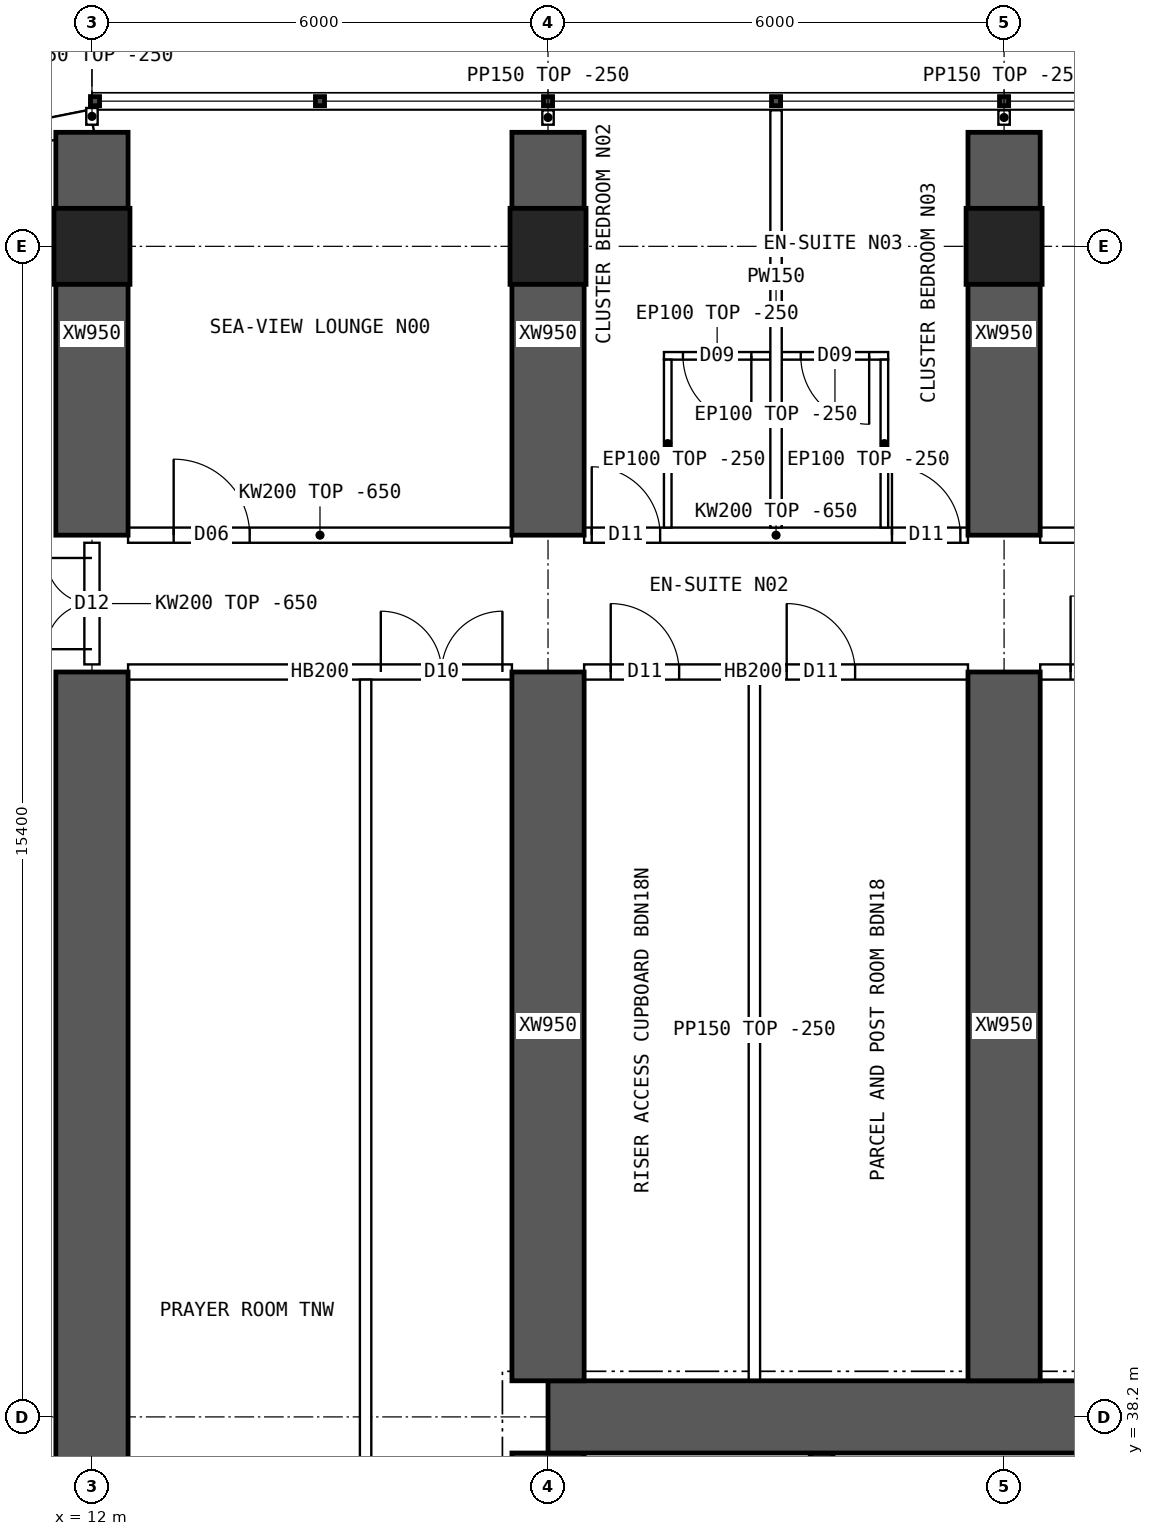
"""IFC4 building model, lengths in metres.
Left out: names, types, materials, properties, quantities, classifications, styles, units other than length and angle.
Written with IfcOpenShell. Run it as: python <this file> out.ifc"""

import sys

from ifc_helpers import new_model, si_unit, direction, frame, frame_2d, origin, origin_2d, place, context, subcontext, project, spatial, polyline, rectangle, hollow_rectangle, outline, extrude, element, fill, save


model = new_model("IFC4")
c1 = context("Model", 3, precision=1e-05, world=origin(), true_north=direction((0.0, 1.0)))
c2 = subcontext(c1, "Body", "Model", "MODEL_VIEW")
j1 = project(units=[si_unit("LENGTHUNIT", "METRE"), si_unit("PLANEANGLEUNIT", "RADIAN")], contexts=[c1])
p1 = place(None, origin())
s1 = spatial("IfcSite", under=j1, at=p1, CompositionType="ELEMENT")
p2 = place(p1, origin())
s2 = spatial("IfcBuilding", under=s1, at=p2, CompositionType="ELEMENT")
p3 = place(p2, frame((0.0, 0.0, 99.4)))
s3 = spatial("IfcBuildingStorey", under=s2, at=p3, CompositionType="ELEMENT", Elevation=99.4)
for number, where, z_axis, x_axis in (
    (1, (12.0, 53.6, 0.0), (0.0, 0.0, 1.0), (1.0, 0.0, 0.0)),
    (2, (18.0, 53.6, 0.0), (0.0, 0.0, 1.0), (1.0, 0.0, 0.0)),
    (3, (24.0, 53.6, 0.0), (0.0, 0.0, 1.0), (1.0, 0.0, 0.0)),
):
    element("IfcColumn", number, at=place(p3, frame(where, z_axis=z_axis, x_axis=x_axis)), inside=s3, PredefinedType="COLUMN", context=c2, shape_type="SweptSolid", body=[
        extrude(hollow_rectangle(XDim=1.0, YDim=1.0, WallThickness=0.1, at=origin_2d()), origin(), (0.0, 0.0, 1.0), 3.75),
    ])
p4 = place(p3, frame((18.0, 38.2, 0.0), z_axis=(0.0, 0.0, 1.0), x_axis=(1.0, 0.0, 0.0)))
e4 = element("IfcWall", 4, at=p4, inside=s3, PredefinedType="SHEAR", context=c2, shape_type="SweptSolid", body=[
    extrude(rectangle(XDim=48.0, YDim=0.95, at=frame_2d((24.0, 0.0))), origin(), (0.0, 0.0, 1.0), 3.75),
])
p5 = place(p3, frame((18.0, 26.275, 0.0), z_axis=(0.0, 0.0, 1.0), x_axis=(0.0, 1.0, 0.0)))
e5 = element("IfcWall", 5, at=p5, inside=s3, PredefinedType="SHEAR", context=c2, shape_type="SweptSolid", body=[
    extrude(rectangle(XDim=11.45, YDim=0.95, at=frame_2d((5.725, 0.0))), origin(), (0.0, 0.0, 1.0), 3.75),
])
p6 = place(p5, frame((5.025, 0.0, 0.0)))
e6 = element("IfcOpeningElement", 6, at=p6, cuts=e5, PredefinedType="OPENING", context=c2, shape_type="SweptSolid", body=[
    extrude(rectangle(XDim=1.2, YDim=2.1, at=frame_2d((0.6, 1.05))), frame((0.0, 0.485, 0.0), z_axis=(0.0, -1.0, 0.0), x_axis=(1.0, 0.0, 0.0)), (0.0, 0.0, 1.0), 0.97),
])
p7 = place(p3, frame((21.6, 34.75, 0.0), z_axis=(0.0, 0.0, 1.0), x_axis=(0.0, 1.0, 0.0)))
e7 = element("IfcWall", 7, at=p7, inside=s3, PredefinedType="SHEAR", context=c2, shape_type="SweptSolid", body=[
    extrude(rectangle(XDim=2.975, YDim=0.3, at=frame_2d((1.488, 0.0))), origin(), (0.0, 0.0, 1.0), 3.75),
])
p8 = place(p3, frame((12.0, 49.8, 0.0), z_axis=(0.0, 0.0, 1.0), x_axis=(0.0, 1.0, 0.0)))
e8 = element("IfcWall", 8, at=p8, inside=s3, PredefinedType="SHEAR", context=c2, shape_type="SweptSolid", body=[
    extrude(rectangle(XDim=5.3, YDim=0.95, at=frame_2d((2.65, 0.0))), origin(), (0.0, 0.0, 1.0), 3.75),
])
p9 = place(p3, frame((12.0, 16.0, 0.0), z_axis=(0.0, 0.0, 1.0), x_axis=(0.0, 1.0, 0.0)))
e9 = element("IfcWall", 9, at=p9, inside=s3, PredefinedType="SHEAR", context=c2, shape_type="SweptSolid", body=[
    extrude(rectangle(XDim=32.0, YDim=0.95, at=frame_2d((16.0, 0.0))), origin(), (0.0, 0.0, 1.0), 3.75),
])
p10 = place(p3, frame((18.0, 49.8, 0.0), z_axis=(0.0, 0.0, 1.0), x_axis=(0.0, 1.0, 0.0)))
e10 = element("IfcWall", 10, at=p10, inside=s3, PredefinedType="SHEAR", context=c2, shape_type="SweptSolid", body=[
    extrude(rectangle(XDim=5.3, YDim=0.95, at=frame_2d((2.65, 0.0))), origin(), (0.0, 0.0, 1.0), 3.75),
])
p11 = place(p3, frame((18.0, 38.675, 0.0), z_axis=(0.0, 0.0, 1.0), x_axis=(0.0, 1.0, 0.0)))
e11 = element("IfcWall", 11, at=p11, inside=s3, PredefinedType="SHEAR", context=c2, shape_type="SweptSolid", body=[
    extrude(rectangle(XDim=9.325, YDim=0.95, at=frame_2d((4.663, 0.0))), origin(), (0.0, 0.0, 1.0), 3.75),
])
p12 = place(p3, frame((24.0, 49.8, 0.0), z_axis=(0.0, 0.0, 1.0), x_axis=(0.0, 1.0, 0.0)))
e12 = element("IfcWall", 12, at=p12, inside=s3, PredefinedType="SHEAR", context=c2, shape_type="SweptSolid", body=[
    extrude(rectangle(XDim=5.3, YDim=0.95, at=frame_2d((2.65, 0.0))), origin(), (0.0, 0.0, 1.0), 3.75),
])
p13 = place(p3, frame((24.0, 38.675, 0.0), z_axis=(0.0, 0.0, 1.0), x_axis=(0.0, 1.0, 0.0)))
e13 = element("IfcWall", 13, at=p13, inside=s3, PredefinedType="SHEAR", context=c2, shape_type="SweptSolid", body=[
    extrude(rectangle(XDim=9.325, YDim=0.95, at=frame_2d((4.663, 0.0))), origin(), (0.0, 0.0, 1.0), 3.75),
])
p14 = place(p3, frame((12.0, 55.25, 0.0), z_axis=(0.0, 0.0, 1.0), x_axis=(-0.980787251524, -0.195080412259, 0.0)))
e14 = element("IfcWall", 14, at=p14, inside=s3, PredefinedType="SOLIDWALL", context=c2, shape_type="SweptSolid", body=[
    extrude(outline(polyline([(-0.03, -0.15), (3.249, -0.15), (3.189, 0.15), (0.03, 0.15), (-0.03, -0.15)])), origin(), (0.0, 0.0, 1.0), 3.5),
])
p15 = place(p14, frame((0.909, 0.0, 0.9)))
e15 = element("IfcOpeningElement", 15, at=p15, cuts=e14, PredefinedType="OPENING", context=c2, shape_type="SweptSolid", body=[
    extrude(rectangle(XDim=1.4, YDim=1.8, at=frame_2d((0.7, 0.9))), frame((0.0, 0.16, 0.0), z_axis=(0.0, -1.0, 0.0), x_axis=(1.0, 0.0, 0.0)), (0.0, 0.0, 1.0), 0.32),
])
p16 = place(p3, frame((12.475, 49.8, 0.0), z_axis=(0.0, 0.0, 1.0), x_axis=(1.0, 0.0, 0.0)))
e16 = element("IfcWall", 16, at=p16, inside=s3, PredefinedType="SOLIDWALL", context=c2, shape_type="SweptSolid", body=[
    extrude(outline(polyline([(0.0, 0.0), (5.05, 0.0), (5.05, 3.1), (0.0, 3.1), (0.0, 0.0)])), frame((0.0, 0.1, 0.0), z_axis=(0.0, -1.0, 0.0), x_axis=(1.0, 0.0, 0.0)), (0.0, 0.0, 1.0), 0.2),
])
p17 = place(p16, frame((0.6, 0.0, 0.0)))
e17 = element("IfcOpeningElement", 17, at=p17, cuts=e16, PredefinedType="OPENING", context=c2, shape_type="SweptSolid", body=[
    extrude(rectangle(XDim=1.0, YDim=2.1, at=frame_2d((0.5, 1.05))), frame((0.0, 0.11, 0.0), z_axis=(0.0, -1.0, 0.0), x_axis=(1.0, 0.0, 0.0)), (0.0, 0.0, 1.0), 0.22),
])
p18 = place(p3, frame((12.475, 48.0, 0.0), z_axis=(0.0, 0.0, 1.0), x_axis=(1.0, 0.0, 0.0)))
e18 = element("IfcWall", 18, at=p18, inside=s3, PredefinedType="SOLIDWALL", context=c2, shape_type="SweptSolid", body=[
    extrude(rectangle(XDim=5.05, YDim=0.2, at=frame_2d((2.525, 0.0))), origin(), (0.0, 0.0, 1.0), 3.5),
])
p19 = place(p18, frame((3.325, 0.0, 0.0)))
e19 = element("IfcOpeningElement", 19, at=p19, cuts=e18, PredefinedType="OPENING", context=c2, shape_type="SweptSolid", body=[
    extrude(rectangle(XDim=1.6, YDim=2.1, at=frame_2d((0.8, 1.05))), frame((0.0, 0.11, 0.0), z_axis=(0.0, -1.0, 0.0), x_axis=(1.0, 0.0, 0.0)), (0.0, 0.0, 1.0), 0.22),
])
p20 = place(p3, frame((18.475, 49.8, 0.0), z_axis=(0.0, 0.0, 1.0), x_axis=(1.0, 0.0, 0.0)))
e20 = element("IfcWall", 20, at=p20, inside=s3, PredefinedType="SOLIDWALL", context=c2, shape_type="SweptSolid", body=[
    extrude(outline(polyline([(0.0, 0.0), (5.05, 0.0), (5.05, 3.1), (0.0, 3.1), (0.0, 0.0)])), frame((0.0, 0.1, 0.0), z_axis=(0.0, -1.0, 0.0), x_axis=(1.0, 0.0, 0.0)), (0.0, 0.0, 1.0), 0.2),
])
p21 = place(p20, frame((0.1, 0.0, 0.0)))
e21 = element("IfcOpeningElement", 21, at=p21, cuts=e20, PredefinedType="OPENING", context=c2, shape_type="SweptSolid", body=[
    extrude(rectangle(XDim=0.9, YDim=2.1, at=frame_2d((0.45, 1.05))), frame((0.0, 0.11, 0.0), z_axis=(0.0, -1.0, 0.0), x_axis=(1.0, 0.0, 0.0)), (0.0, 0.0, 1.0), 0.22),
])
p22 = place(p20, frame((4.05, 0.0, 0.0)))
e22 = element("IfcOpeningElement", 22, at=p22, cuts=e20, PredefinedType="OPENING", context=c2, shape_type="SweptSolid", body=[
    extrude(rectangle(XDim=0.9, YDim=2.1, at=frame_2d((0.45, 1.05))), frame((0.0, 0.11, 0.0), z_axis=(0.0, -1.0, 0.0), x_axis=(1.0, 0.0, 0.0)), (0.0, 0.0, 1.0), 0.22),
])
p23 = place(p3, frame((18.475, 48.0, 0.0), z_axis=(0.0, 0.0, 1.0), x_axis=(1.0, 0.0, 0.0)))
e23 = element("IfcWall", 23, at=p23, inside=s3, PredefinedType="SOLIDWALL", context=c2, shape_type="SweptSolid", body=[
    extrude(rectangle(XDim=5.05, YDim=0.2, at=frame_2d((2.525, 0.0))), origin(), (0.0, 0.0, 1.0), 3.5),
])
p24 = place(p23, frame((0.35, 0.0, 0.0)))
e24 = element("IfcOpeningElement", 24, at=p24, cuts=e23, PredefinedType="OPENING", context=c2, shape_type="SweptSolid", body=[
    extrude(rectangle(XDim=0.9, YDim=2.1, at=frame_2d((0.45, 1.05))), frame((0.0, 0.11, 0.0), z_axis=(0.0, -1.0, 0.0), x_axis=(1.0, 0.0, 0.0)), (0.0, 0.0, 1.0), 0.22),
])
p25 = place(p23, frame((2.665, 0.0, 0.0)))
e25 = element("IfcOpeningElement", 25, at=p25, cuts=e23, PredefinedType="OPENING", context=c2, shape_type="SweptSolid", body=[
    extrude(rectangle(XDim=0.9, YDim=2.1, at=frame_2d((0.45, 1.05))), frame((0.0, 0.11, 0.0), z_axis=(0.0, -1.0, 0.0), x_axis=(1.0, 0.0, 0.0)), (0.0, 0.0, 1.0), 0.22),
])
p26 = place(p3, frame((24.475, 49.8, 0.0), z_axis=(0.0, 0.0, 1.0), x_axis=(1.0, 0.0, 0.0)))
e26 = element("IfcWall", 26, at=p26, inside=s3, PredefinedType="SOLIDWALL", context=c2, shape_type="SweptSolid", body=[
    extrude(outline(polyline([(0.0, 0.0), (5.05, 0.0), (5.05, 3.1), (0.0, 3.1), (0.0, 0.0)])), frame((0.0, 0.1, 0.0), z_axis=(0.0, -1.0, 0.0), x_axis=(1.0, 0.0, 0.0)), (0.0, 0.0, 1.0), 0.2),
])
p27 = place(p26, frame((0.6, 0.0, 0.0)))
e27 = element("IfcOpeningElement", 27, at=p27, cuts=e26, PredefinedType="OPENING", context=c2, shape_type="SweptSolid", body=[
    extrude(rectangle(XDim=1.0, YDim=2.1, at=frame_2d((0.5, 1.05))), frame((0.0, 0.11, 0.0), z_axis=(0.0, -1.0, 0.0), x_axis=(1.0, 0.0, 0.0)), (0.0, 0.0, 1.0), 0.22),
])
p28 = place(p3, frame((24.475, 48.0, 0.0), z_axis=(0.0, 0.0, 1.0), x_axis=(1.0, 0.0, 0.0)))
e28 = element("IfcWall", 28, at=p28, inside=s3, PredefinedType="SOLIDWALL", context=c2, shape_type="SweptSolid", body=[
    extrude(rectangle(XDim=5.05, YDim=0.2, at=frame_2d((2.525, 0.0))), origin(), (0.0, 0.0, 1.0), 3.5),
])
p29 = place(p28, frame((0.4, 0.0, 0.0)))
e29 = element("IfcOpeningElement", 29, at=p29, cuts=e28, PredefinedType="OPENING", context=c2, shape_type="SweptSolid", body=[
    extrude(rectangle(XDim=1.0, YDim=2.1, at=frame_2d((0.5, 1.05))), frame((0.0, 0.11, 0.0), z_axis=(0.0, -1.0, 0.0), x_axis=(1.0, 0.0, 0.0)), (0.0, 0.0, 1.0), 0.22),
])
p30 = place(p3, frame((21.0, 55.39, 0.0), z_axis=(0.0, 0.0, 1.0), x_axis=(0.0, -1.0, 0.0)))
e30 = element("IfcWall", 30, at=p30, inside=s3, PredefinedType="PARTITIONING", context=c2, shape_type="SweptSolid", body=[
    extrude(outline(polyline([(0.0, 0.0), (5.49, 0.0), (5.49, 3.1), (5.442, 3.1), (5.44, 3.5), (1.992, 3.5), (1.99, 3.1), (1.592, 3.1), (1.59, 3.5), (0.0, 3.5), (0.0, 0.0)])), frame((0.0, 0.075, 0.0), z_axis=(0.0, -1.0, 0.0), x_axis=(1.0, 0.0, 0.0)), (0.0, 0.0, 1.0), 0.15),
])
p31 = place(p3, frame((19.525, 52.159, 0.0), z_axis=(0.0, 0.0, 1.0), x_axis=(1.0, 0.0, 0.0)))
e31 = element("IfcWall", 31, at=p31, inside=s3, PredefinedType="PARTITIONING", context=c2, shape_type="SweptSolid", body=[
    extrude(rectangle(XDim=1.4, YDim=0.1, at=frame_2d((0.7, 0.0))), origin(), (0.0, 0.0, 1.0), 3.5),
])
p32 = place(p31, frame((0.25, 0.0, 0.0)))
e32 = element("IfcOpeningElement", 32, at=p32, cuts=e31, PredefinedType="OPENING", context=c2, shape_type="SweptSolid", body=[
    extrude(rectangle(XDim=0.9, YDim=2.1, at=frame_2d((0.45, 1.05))), frame((0.0, 0.06, 0.0), z_axis=(0.0, -1.0, 0.0), x_axis=(1.0, 0.0, 0.0)), (0.0, 0.0, 1.0), 0.12),
])
p33 = place(p3, frame((19.575, 52.109, 0.0), z_axis=(0.0, 0.0, 1.0), x_axis=(0.0, -1.0, 0.0)))
e33 = element("IfcWall", 33, at=p33, inside=s3, PredefinedType="PARTITIONING", context=c2, shape_type="SweptSolid", body=[
    extrude(outline(polyline([(0.0, 0.0), (2.209, 0.0), (2.209, 3.1), (2.161, 3.1), (2.159, 3.5), (0.0, 3.5), (0.0, 0.0)])), frame((0.0, 0.05, 0.0), z_axis=(0.0, -1.0, 0.0), x_axis=(1.0, 0.0, 0.0)), (0.0, 0.0, 1.0), 0.1),
])
p34 = place(p3, frame((21.075, 52.159, 0.0), z_axis=(0.0, 0.0, 1.0), x_axis=(1.0, 0.0, 0.0)))
e34 = element("IfcWall", 34, at=p34, inside=s3, PredefinedType="PARTITIONING", context=c2, shape_type="SweptSolid", body=[
    extrude(rectangle(XDim=1.4, YDim=0.1, at=frame_2d((0.7, 0.0))), origin(), (0.0, 0.0, 1.0), 3.5),
])
p35 = place(p34, frame((0.25, 0.0, 0.0)))
e35 = element("IfcOpeningElement", 35, at=p35, cuts=e34, PredefinedType="OPENING", context=c2, shape_type="SweptSolid", body=[
    extrude(rectangle(XDim=0.9, YDim=2.1, at=frame_2d((0.45, 1.05))), frame((0.0, 0.06, 0.0), z_axis=(0.0, -1.0, 0.0), x_axis=(1.0, 0.0, 0.0)), (0.0, 0.0, 1.0), 0.12),
])
p36 = place(p3, frame((22.425, 52.109, 0.0), z_axis=(0.0, 0.0, 1.0), x_axis=(0.0, -1.0, 0.0)))
e36 = element("IfcWall", 36, at=p36, inside=s3, PredefinedType="PARTITIONING", context=c2, shape_type="SweptSolid", body=[
    extrude(outline(polyline([(0.0, 0.0), (2.209, 0.0), (2.209, 3.1), (2.161, 3.1), (2.159, 3.5), (0.0, 3.5), (0.0, 0.0)])), frame((0.0, 0.05, 0.0), z_axis=(0.0, -1.0, 0.0), x_axis=(1.0, 0.0, 0.0)), (0.0, 0.0, 1.0), 0.1),
])
p37 = place(p3, frame((20.715, 38.675, 0.0), z_axis=(0.0, 0.0, 1.0), x_axis=(0.0, 1.0, 0.0)))
e37 = element("IfcWall", 37, at=p37, inside=s3, PredefinedType="PARTITIONING", context=c2, shape_type="SweptSolid", body=[
    extrude(rectangle(XDim=9.225, YDim=0.15, at=frame_2d((4.612, 0.0))), origin(), (0.0, 0.0, 1.0), 3.5),
])
p38 = place(p3, frame((15.6, 16.1, 0.0), z_axis=(0.0, 0.0, 1.0), x_axis=(0.0, 1.0, 0.0)))
e38 = element("IfcWall", 38, at=p38, inside=s3, PredefinedType="PARTITIONING", context=c2, shape_type="SweptSolid", body=[
    extrude(rectangle(XDim=31.8, YDim=0.15, at=frame_2d((15.9, 0.0))), origin(), (0.0, 0.0, 1.0), 3.5),
])
p39 = place(p38, frame((13.2, 0.0, 0.0)))
e39 = element("IfcOpeningElement", 39, at=p39, cuts=e38, PredefinedType="OPENING", context=c2, shape_type="SweptSolid", body=[
    extrude(rectangle(XDim=1.0, YDim=2.1, at=frame_2d((0.5, 1.05))), frame((0.0, 0.085, 0.0), z_axis=(0.0, -1.0, 0.0), x_axis=(1.0, 0.0, 0.0)), (0.0, 0.0, 1.0), 0.17),
])
p40 = place(p38, frame((16.2, 0.0, 0.0)))
e40 = element("IfcOpeningElement", 40, at=p40, cuts=e38, PredefinedType="OPENING", context=c2, shape_type="SweptSolid", body=[
    extrude(rectangle(XDim=1.0, YDim=2.1, at=frame_2d((0.5, 1.05))), frame((0.0, 0.085, 0.0), z_axis=(0.0, -1.0, 0.0), x_axis=(1.0, 0.0, 0.0)), (0.0, 0.0, 1.0), 0.17),
])
p41 = place(p3, frame((12.0, 48.1, 0.0), z_axis=(0.0, 0.0, 1.0), x_axis=(0.0, 1.0, 0.0)))
e41 = element("IfcWall", 41, at=p41, inside=s3, PredefinedType="SOLIDWALL", context=c2, shape_type="SweptSolid", body=[
    extrude(outline(polyline([(0.0, 0.0), (1.6, 0.0), (1.6, 3.1), (0.0, 3.1), (0.0, 0.0)])), frame((0.0, 0.1, 0.0), z_axis=(0.0, -1.0, 0.0), x_axis=(1.0, 0.0, 0.0)), (0.0, 0.0, 1.0), 0.2),
])
p42 = place(p41, frame((0.2, 0.0, 0.0)))
e42 = element("IfcOpeningElement", 42, at=p42, cuts=e41, PredefinedType="OPENING", context=c2, shape_type="SweptSolid", body=[
    extrude(rectangle(XDim=1.2, YDim=2.1, at=frame_2d((0.6, 1.05))), frame((0.0, 0.11, 0.0), z_axis=(0.0, -1.0, 0.0), x_axis=(1.0, 0.0, 0.0)), (0.0, 0.0, 1.0), 0.22),
])
p43 = place(p3, frame((12.0, 55.2, 0.0), z_axis=(0.0, 0.0, 1.0), x_axis=(0.0, 1.0, 0.0)))
e43 = element("IfcWall", 43, at=p43, inside=s3, PredefinedType="PARTITIONING", context=c2, shape_type="SweptSolid", body=[
    extrude(rectangle(XDim=0.22, YDim=0.15, at=frame_2d((0.11, 0.0))), origin(), (0.0, 0.0, 1.0), 3.5),
])
for number, where, z_axis, x_axis in (
    (44, (18.0, 55.2, 0.0), (0.0, 0.0, 1.0), (0.0, 1.0, 0.0)),
    (45, (24.0, 55.2, 0.0), (0.0, 0.0, 1.0), (0.0, 1.0, 0.0)),
):
    element("IfcWall", number, at=place(p3, frame(where, z_axis=z_axis, x_axis=x_axis)), inside=s3, PredefinedType="PARTITIONING", context=c2, shape_type="SweptSolid", body=[
        extrude(rectangle(XDim=0.19, YDim=0.15, at=frame_2d((0.095, 0.0))), origin(), (0.0, 0.0, 1.0), 3.5),
    ])
p44 = place(p19, origin())
e46 = element("IfcDoor", 46, at=p44, inside=s3, OperationType="DOUBLE_DOOR_SINGLE_SWING", PredefinedType="DOOR", context=c2, shape_type="SweptSolid", body=[
    extrude(rectangle(XDim=1.6, YDim=2.1, at=frame_2d((0.8, 1.05))), frame((0.0, 0.025, 0.0), z_axis=(0.0, -1.0, 0.0), x_axis=(1.0, 0.0, 0.0)), (0.0, 0.0, 1.0), 0.05),
])
fill(e19, e46)
p45 = place(p17, origin())
e47 = element("IfcDoor", 47, at=p45, inside=s3, OperationType="SINGLE_SWING_LEFT", PredefinedType="DOOR", context=c2, shape_type="SweptSolid", body=[
    extrude(rectangle(XDim=1.0, YDim=2.1, at=frame_2d((0.5, 1.05))), frame((0.0, 0.025, 0.0), z_axis=(0.0, -1.0, 0.0), x_axis=(1.0, 0.0, 0.0)), (0.0, 0.0, 1.0), 0.05),
])
fill(e17, e47)
p46 = place(p32, origin())
e48 = element("IfcDoor", 48, at=p46, inside=s3, OperationType="SINGLE_SWING_RIGHT", PredefinedType="DOOR", context=c2, shape_type="SweptSolid", body=[
    extrude(rectangle(XDim=0.9, YDim=2.1, at=frame_2d((0.45, 1.05))), frame((0.0, 0.025, 0.0), z_axis=(0.0, -1.0, 0.0), x_axis=(1.0, 0.0, 0.0)), (0.0, 0.0, 1.0), 0.05),
])
fill(e32, e48)
p47 = place(p21, origin())
e49 = element("IfcDoor", 49, at=p47, inside=s3, OperationType="SINGLE_SWING_LEFT", PredefinedType="DOOR", context=c2, shape_type="SweptSolid", body=[
    extrude(rectangle(XDim=0.9, YDim=2.1, at=frame_2d((0.45, 1.05))), frame((0.0, 0.025, 0.0), z_axis=(0.0, -1.0, 0.0), x_axis=(1.0, 0.0, 0.0)), (0.0, 0.0, 1.0), 0.05),
])
fill(e21, e49)
p48 = place(p35, origin())
e50 = element("IfcDoor", 50, at=p48, inside=s3, OperationType="SINGLE_SWING_RIGHT", PredefinedType="DOOR", context=c2, shape_type="SweptSolid", body=[
    extrude(rectangle(XDim=0.9, YDim=2.1, at=frame_2d((0.45, 1.05))), frame((0.0, 0.025, 0.0), z_axis=(0.0, -1.0, 0.0), x_axis=(1.0, 0.0, 0.0)), (0.0, 0.0, 1.0), 0.05),
])
fill(e35, e50)
p49 = place(p22, origin())
e51 = element("IfcDoor", 51, at=p49, inside=s3, OperationType="SINGLE_SWING_LEFT", PredefinedType="DOOR", context=c2, shape_type="SweptSolid", body=[
    extrude(rectangle(XDim=0.9, YDim=2.1, at=frame_2d((0.45, 1.05))), frame((0.0, 0.025, 0.0), z_axis=(0.0, -1.0, 0.0), x_axis=(1.0, 0.0, 0.0)), (0.0, 0.0, 1.0), 0.05),
])
fill(e22, e51)
p50 = place(p24, origin())
e52 = element("IfcDoor", 52, at=p50, inside=s3, OperationType="SINGLE_SWING_LEFT", PredefinedType="DOOR", context=c2, shape_type="SweptSolid", body=[
    extrude(rectangle(XDim=0.9, YDim=2.1, at=frame_2d((0.45, 1.05))), frame((0.0, 0.025, 0.0), z_axis=(0.0, -1.0, 0.0), x_axis=(1.0, 0.0, 0.0)), (0.0, 0.0, 1.0), 0.05),
])
fill(e24, e52)
p51 = place(p25, origin())
e53 = element("IfcDoor", 53, at=p51, inside=s3, OperationType="SINGLE_SWING_LEFT", PredefinedType="DOOR", context=c2, shape_type="SweptSolid", body=[
    extrude(rectangle(XDim=0.9, YDim=2.1, at=frame_2d((0.45, 1.05))), frame((0.0, 0.025, 0.0), z_axis=(0.0, -1.0, 0.0), x_axis=(1.0, 0.0, 0.0)), (0.0, 0.0, 1.0), 0.05),
])
fill(e25, e53)
p52 = place(p29, origin())
e54 = element("IfcDoor", 54, at=p52, inside=s3, OperationType="SINGLE_SWING_LEFT", PredefinedType="DOOR", context=c2, shape_type="SweptSolid", body=[
    extrude(rectangle(XDim=1.0, YDim=2.1, at=frame_2d((0.5, 1.05))), frame((0.0, 0.025, 0.0), z_axis=(0.0, -1.0, 0.0), x_axis=(1.0, 0.0, 0.0)), (0.0, 0.0, 1.0), 0.05),
])
fill(e29, e54)
p53 = place(p42, origin())
e55 = element("IfcDoor", 55, at=p53, inside=s3, OperationType="DOUBLE_DOOR_SINGLE_SWING", PredefinedType="DOOR", context=c2, shape_type="SweptSolid", body=[
    extrude(rectangle(XDim=1.2, YDim=2.1, at=frame_2d((0.6, 1.05))), frame((0.0, 0.025, 0.0), z_axis=(0.0, -1.0, 0.0), x_axis=(1.0, 0.0, 0.0)), (0.0, 0.0, 1.0), 0.05),
])
fill(e42, e55)
save(model, sys.argv[1])
